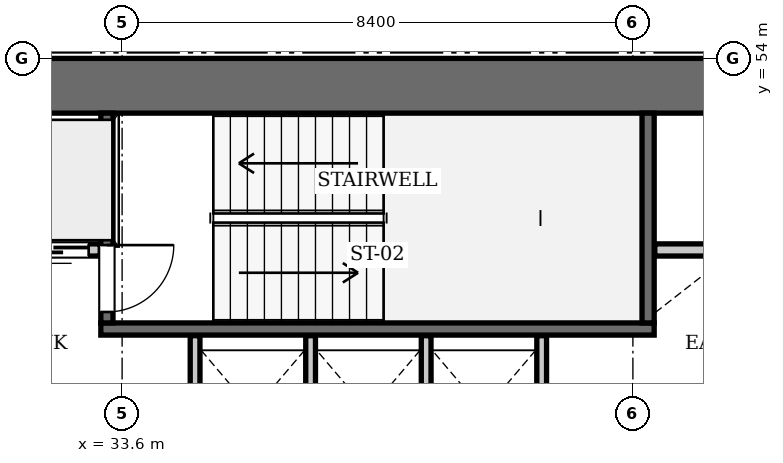
"""IFC4 building model, lengths in metres.
Left out: names, types, materials, properties, quantities, classifications, styles, units other than length and angle.
Written with IfcOpenShell. Run it as: python <this file> out.ifc"""

import sys

from ifc_helpers import new_model, si_unit, direction, frame, frame_2d, origin, place, context, subcontext, project, spatial, rectangle, extrude, element, fill, save


model = new_model("IFC4")
c1 = context("Model", 3, precision=1e-05, world=origin(), true_north=direction((0.0, 1.0)))
c2 = subcontext(c1, "Body", "Model", "MODEL_VIEW")
j1 = project(units=[si_unit("LENGTHUNIT", "METRE"), si_unit("PLANEANGLEUNIT", "RADIAN")], contexts=[c1])
p1 = place(None, origin())
s1 = spatial("IfcSite", under=j1, at=p1, CompositionType="ELEMENT")
p2 = place(p1, origin())
s2 = spatial("IfcBuilding", under=s1, at=p2, CompositionType="ELEMENT")
p3 = place(p2, frame((0.0, 0.0, 38.5)))
s3 = spatial("IfcBuildingStorey", under=s2, at=p3, CompositionType="ELEMENT", Elevation=38.5)
p4 = place(p3, frame((25.2, 53.55, 0.0), z_axis=(0.0, 0.0, 1.0), x_axis=(1.0, 0.0, 0.0)))
e1 = element("IfcWall", 1, at=p4, inside=s3, PredefinedType="SHEAR", context=c2, shape_type="SweptSolid", body=[
    extrude(rectangle(XDim=25.2, YDim=0.9, at=frame_2d((12.6, 0.0))), origin(), (0.0, 0.0, 1.0), 3.85),
])
p5 = place(p3, frame((33.25, 49.55, 0.0), z_axis=(0.0, 0.0, 1.0), x_axis=(1.0, 0.0, 0.0)))
e2 = element("IfcWall", 2, at=p5, inside=s3, PredefinedType="SOLIDWALL", context=c2, shape_type="SweptSolid", body=[
    extrude(rectangle(XDim=9.1, YDim=0.2, at=frame_2d((4.55, 0.0))), origin(), (0.0, 0.0, 1.0), 3.61),
])
p6 = place(p3, frame((42.25, 49.65, 0.0), z_axis=(0.0, 0.0, 1.0), x_axis=(0.0, 1.0, 0.0)))
e3 = element("IfcWall", 3, at=p6, inside=s3, PredefinedType="SOLIDWALL", context=c2, shape_type="SweptSolid", body=[
    extrude(rectangle(XDim=3.45, YDim=0.2, at=frame_2d((1.725, 0.0))), origin(), (0.0, 0.0, 1.0), 3.61),
])
p7 = place(p3, frame((33.35, 49.65, 0.0), z_axis=(0.0, 0.0, 1.0), x_axis=(0.0, 1.0, 0.0)))
e4 = element("IfcWall", 4, at=p7, inside=s3, PredefinedType="SOLIDWALL", context=c2, shape_type="SweptSolid", body=[
    extrude(rectangle(XDim=3.45, YDim=0.2, at=frame_2d((1.725, 0.0))), origin(), (0.0, 0.0, 1.0), 3.61),
])
p8 = place(p7, frame((0.18, 0.0, 0.0)))
e5 = element("IfcOpeningElement", 5, at=p8, cuts=e4, PredefinedType="OPENING", context=c2, shape_type="SweptSolid", body=[
    extrude(rectangle(XDim=1.1, YDim=2.15, at=frame_2d((0.55, 1.075))), frame((0.0, 0.11, 0.0), z_axis=(0.0, -1.0, 0.0), x_axis=(1.0, 0.0, 0.0)), (0.0, 0.0, 1.0), 0.22),
])
p9 = place(p3, frame((31.86, 50.85, 0.0), z_axis=(0.0, 0.0, 1.0), x_axis=(1.0, 0.0, 0.0)))
e6 = element("IfcWall", 6, at=p9, inside=s3, PredefinedType="SOLIDWALL", context=c2, shape_type="SweptSolid", body=[
    extrude(rectangle(XDim=1.38, YDim=0.2, at=frame_2d((0.69, 0.0))), origin(), (0.0, 0.0, 1.0), 3.61),
])
p10 = place(p9, frame((0.19, 0.0, 0.0)))
e7 = element("IfcOpeningElement", 7, at=p10, cuts=e6, PredefinedType="OPENING", context=c2, shape_type="SweptSolid", body=[
    extrude(rectangle(XDim=1.0, YDim=2.15, at=frame_2d((0.5, 1.075))), frame((0.0, 0.11, 0.0), z_axis=(0.0, -1.0, 0.0), x_axis=(1.0, 0.0, 0.0)), (0.0, 0.0, 1.0), 0.22),
])
p11 = place(p3, frame((42.36, 50.85, 0.0), z_axis=(0.0, 0.0, 1.0), x_axis=(1.0, 0.0, 0.0)))
e8 = element("IfcWall", 8, at=p11, inside=s3, PredefinedType="SOLIDWALL", context=c2, shape_type="SweptSolid", body=[
    extrude(rectangle(XDim=1.38, YDim=0.2, at=frame_2d((0.69, 0.0))), origin(), (0.0, 0.0, 1.0), 3.61),
])
for number, where, z_axis, x_axis in (
    (9, (34.8, 47.25, 0.0), (0.0, 0.0, 1.0), (0.0, 1.0, 0.0)),
    (10, (36.7, 47.25, 0.0), (0.0, 0.0, 1.0), (0.0, 1.0, 0.0)),
    (11, (38.6, 47.25, 0.0), (0.0, 0.0, 1.0), (0.0, 1.0, 0.0)),
    (12, (40.5, 47.25, 0.0), (0.0, 0.0, 1.0), (0.0, 1.0, 0.0)),
):
    element("IfcWall", number, at=place(p3, frame(where, z_axis=z_axis, x_axis=x_axis)), inside=s3, PredefinedType="SOLIDWALL", context=c2, shape_type="SweptSolid", body=[
        extrude(rectangle(XDim=2.19, YDim=0.16, at=frame_2d((1.095, 0.0))), origin(), (0.0, 0.0, 1.0), 3.61),
    ])
p12 = place(p8, frame((1.1, 0.0, 0.0), z_axis=(0.0, 0.0, 1.0), x_axis=(-1.0, 0.0, 0.0)))
e13 = element("IfcDoor", 13, at=p12, inside=s3, OperationType="SINGLE_SWING_LEFT", PredefinedType="DOOR", context=c2, shape_type="SweptSolid", body=[
    extrude(rectangle(XDim=1.1, YDim=2.15, at=frame_2d((0.55, 1.075))), frame((0.0, 0.025, 0.0), z_axis=(0.0, -1.0, 0.0), x_axis=(1.0, 0.0, 0.0)), (0.0, 0.0, 1.0), 0.05),
])
fill(e5, e13)
p13 = place(p10, frame((1.0, 0.0, 0.0), z_axis=(0.0, 0.0, 1.0), x_axis=(-1.0, 0.0, 0.0)))
e14 = element("IfcDoor", 14, at=p13, inside=s3, OperationType="SLIDING_TO_LEFT", PredefinedType="DOOR", context=c2, shape_type="SweptSolid", body=[
    extrude(rectangle(XDim=1.0, YDim=2.15, at=frame_2d((0.5, 1.075))), frame((0.0, 0.025, 0.0), z_axis=(0.0, -1.0, 0.0), x_axis=(1.0, 0.0, 0.0)), (0.0, 0.0, 1.0), 0.05),
])
fill(e7, e14)
save(model, sys.argv[1])
